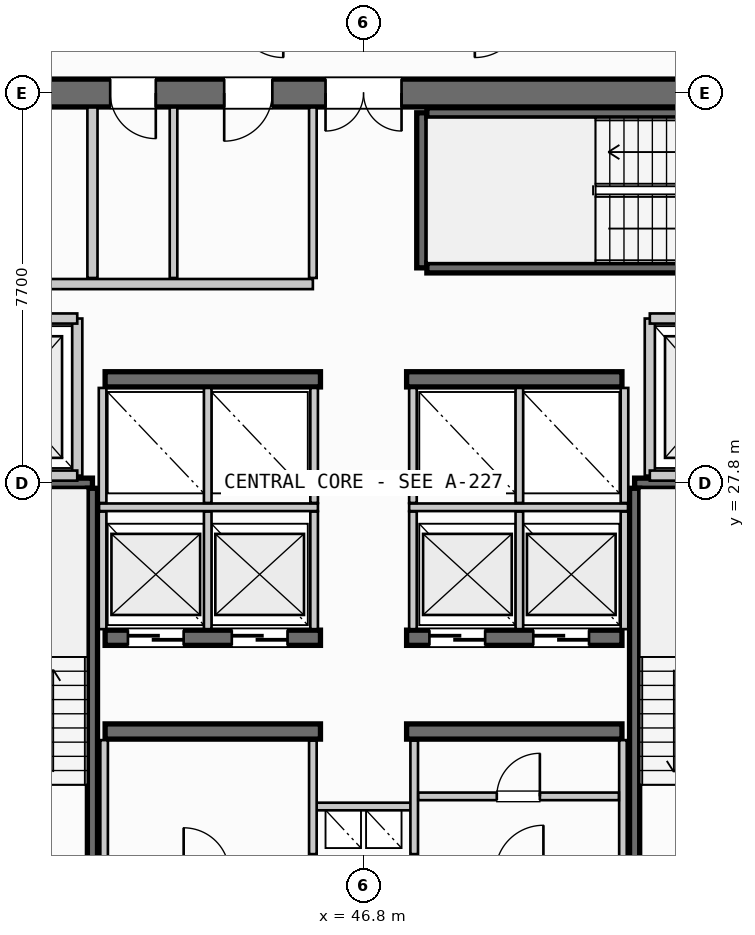
"""IFC4 building model, lengths in metres.
Left out: names, types, materials, properties, quantities, classifications, styles, units other than length and angle.
Written with IfcOpenShell. Run it as: python <this file> out.ifc"""

import sys

from ifc_helpers import new_model, si_unit, direction, frame, frame_2d, origin, place, context, subcontext, project, spatial, rectangle, extrude, source, transform, mapped, element, fill, save


model = new_model("IFC4")
c1 = context("Model", 3, precision=1e-05, world=origin(), true_north=direction((0.0, 1.0)))
c2 = subcontext(c1, "Body", "Model", "MODEL_VIEW")
j1 = project(units=[si_unit("LENGTHUNIT", "METRE"), si_unit("PLANEANGLEUNIT", "RADIAN")], contexts=[c1])
p1 = place(None, origin())
s1 = spatial("IfcSite", under=j1, at=p1, CompositionType="ELEMENT")
p2 = place(p1, origin())
s2 = spatial("IfcBuilding", under=s1, at=p2, CompositionType="ELEMENT")
p3 = place(p2, frame((0.0, 0.0, 197.4)))
s3 = spatial("IfcBuildingStorey", under=s2, at=p3, CompositionType="ELEMENT", Elevation=197.4)
p4 = place(p3, frame((55.6, 35.5, 0.0), z_axis=(0.0, 0.0, 1.0), x_axis=(-1.0, 0.0, 0.0)))
e1 = element("IfcWall", 1, at=p4, inside=s3, PredefinedType="SHEAR", context=c2, shape_type="SweptSolid", body=[
    extrude(rectangle(XDim=17.6, YDim=0.55, at=frame_2d((8.8, 0.0))), origin(), (0.0, 0.0, 1.0), 3.26),
])
p5 = place(p4, frame((8.05, 0.0, 0.0)))
e2 = element("IfcOpeningElement", 2, at=p5, cuts=e1, PredefinedType="OPENING", context=c2, shape_type="SweptSolid", body=[
    extrude(rectangle(XDim=1.5, YDim=2.2, at=frame_2d((0.75, 1.1))), frame((0.0, 0.285, 0.0), z_axis=(0.0, -1.0, 0.0), x_axis=(1.0, 0.0, 0.0)), (0.0, 0.0, 1.0), 0.57),
])
p6 = place(p4, frame((15.1, 0.0, 0.0)))
e3 = element("IfcOpeningElement", 3, at=p6, cuts=e1, PredefinedType="OPENING", context=c2, shape_type="SweptSolid", body=[
    extrude(rectangle(XDim=0.95, YDim=2.15, at=frame_2d((0.475, 1.075))), frame((0.0, 0.285, 0.0), z_axis=(0.0, -1.0, 0.0), x_axis=(1.0, 0.0, 0.0)), (0.0, 0.0, 1.0), 0.57),
])
p7 = place(p4, frame((12.9, 0.0, 0.0)))
e4 = element("IfcOpeningElement", 4, at=p7, cuts=e1, PredefinedType="OPENING", context=c2, shape_type="SweptSolid", body=[
    extrude(rectangle(XDim=0.9, YDim=2.15, at=frame_2d((0.45, 1.075))), frame((0.0, 0.285, 0.0), z_axis=(0.0, -1.0, 0.0), x_axis=(1.0, 0.0, 0.0)), (0.0, 0.0, 1.0), 0.57),
])
p8 = place(p4, frame((10.6, 0.0, 0.0)))
e5 = element("IfcOpeningElement", 5, at=p8, cuts=e1, PredefinedType="OPENING", context=c2, shape_type="SweptSolid", body=[
    extrude(rectangle(XDim=0.95, YDim=2.15, at=frame_2d((0.475, 1.075))), frame((0.0, 0.285, 0.0), z_axis=(0.0, -1.0, 0.0), x_axis=(1.0, 0.0, 0.0)), (0.0, 0.0, 1.0), 0.57),
])
for number, where, z_axis, x_axis in (
    (6, (41.7, 22.9, 0.0), (0.0, 0.0, 1.0), (1.0, 0.0, 0.0)),
    (7, (47.65, 22.9, 0.0), (0.0, 0.0, 1.0), (1.0, 0.0, 0.0)),
):
    element("IfcWall", number, at=place(p3, frame(where, z_axis=z_axis, x_axis=x_axis)), inside=s3, PredefinedType="SHEAR", context=c2, shape_type="SweptSolid", body=[
        extrude(rectangle(XDim=4.25, YDim=0.3, at=frame_2d((2.125, 0.0))), origin(), (0.0, 0.0, 1.0), 3.26),
    ])
p9 = place(p3, frame((41.7, 24.75, 0.0), z_axis=(0.0, 0.0, 1.0), x_axis=(1.0, 0.0, 0.0)))
e8 = element("IfcWall", 8, at=p9, inside=s3, PredefinedType="SHEAR", context=c2, shape_type="SweptSolid", body=[
    extrude(rectangle(XDim=4.25, YDim=0.3, at=frame_2d((2.125, 0.0))), origin(), (0.0, 0.0, 1.0), 3.26),
])
p10 = place(p9, frame((0.45, 0.0, 0.0)))
e9 = element("IfcOpeningElement", 9, at=p10, cuts=e8, PredefinedType="OPENING", context=c2, shape_type="SweptSolid", body=[
    extrude(rectangle(XDim=1.1, YDim=2.2, at=frame_2d((0.55, 1.1))), frame((0.0, 0.16, 0.0), z_axis=(0.0, -1.0, 0.0), x_axis=(1.0, 0.0, 0.0)), (0.0, 0.0, 1.0), 0.32),
])
p11 = place(p9, frame((2.5, 0.0, 0.0)))
e10 = element("IfcOpeningElement", 10, at=p11, cuts=e8, PredefinedType="OPENING", context=c2, shape_type="SweptSolid", body=[
    extrude(rectangle(XDim=1.1, YDim=2.2, at=frame_2d((0.55, 1.1))), frame((0.0, 0.16, 0.0), z_axis=(0.0, -1.0, 0.0), x_axis=(1.0, 0.0, 0.0)), (0.0, 0.0, 1.0), 0.32),
])
p12 = place(p3, frame((47.65, 24.75, 0.0), z_axis=(0.0, 0.0, 1.0), x_axis=(1.0, 0.0, 0.0)))
e11 = element("IfcWall", 11, at=p12, inside=s3, PredefinedType="SHEAR", context=c2, shape_type="SweptSolid", body=[
    extrude(rectangle(XDim=4.25, YDim=0.3, at=frame_2d((2.125, 0.0))), origin(), (0.0, 0.0, 1.0), 3.26),
])
p13 = place(p12, frame((0.45, 0.0, 0.0)))
e12 = element("IfcOpeningElement", 12, at=p13, cuts=e11, PredefinedType="OPENING", context=c2, shape_type="SweptSolid", body=[
    extrude(rectangle(XDim=1.1, YDim=2.2, at=frame_2d((0.55, 1.1))), frame((0.0, 0.16, 0.0), z_axis=(0.0, -1.0, 0.0), x_axis=(1.0, 0.0, 0.0)), (0.0, 0.0, 1.0), 0.32),
])
p14 = place(p12, frame((2.5, 0.0, 0.0)))
e13 = element("IfcOpeningElement", 13, at=p14, cuts=e11, PredefinedType="OPENING", context=c2, shape_type="SweptSolid", body=[
    extrude(rectangle(XDim=1.1, YDim=2.2, at=frame_2d((0.55, 1.1))), frame((0.0, 0.16, 0.0), z_axis=(0.0, -1.0, 0.0), x_axis=(1.0, 0.0, 0.0)), (0.0, 0.0, 1.0), 0.32),
])
for number, where, z_axis, x_axis in (
    (14, (41.7, 29.85, 0.0), (0.0, 0.0, 1.0), (1.0, 0.0, 0.0)),
    (15, (47.65, 29.85, 0.0), (0.0, 0.0, 1.0), (1.0, 0.0, 0.0)),
):
    element("IfcWall", number, at=place(p3, frame(where, z_axis=z_axis, x_axis=x_axis)), inside=s3, PredefinedType="SHEAR", context=c2, shape_type="SweptSolid", body=[
        extrude(rectangle(XDim=4.25, YDim=0.3, at=frame_2d((2.125, 0.0))), origin(), (0.0, 0.0, 1.0), 3.26),
    ])
p15 = place(p3, frame((38.39, 27.8, 0.0), z_axis=(0.0, 0.0, 1.0), x_axis=(1.0, 0.0, 0.0)))
e16 = element("IfcWall", 16, at=p15, inside=s3, PredefinedType="SHEAR", context=c2, shape_type="SweptSolid", body=[
    extrude(rectangle(XDim=3.06, YDim=0.2, at=frame_2d((1.53, 0.0))), origin(), (0.0, 0.0, 1.0), 3.26),
])
p16 = place(p3, frame((41.45, 27.7, 0.0), z_axis=(0.0, 0.0, 1.0), x_axis=(0.0, -1.0, 0.0)))
e17 = element("IfcWall", 17, at=p16, inside=s3, PredefinedType="SHEAR", context=c2, shape_type="SweptSolid", body=[
    extrude(rectangle(XDim=7.35, YDim=0.2, at=frame_2d((3.675, 0.0))), origin(), (0.0, 0.0, 1.0), 3.26),
])
p17 = place(p3, frame((52.15, 27.8, 0.0), z_axis=(0.0, 0.0, 1.0), x_axis=(1.0, 0.0, 0.0)))
e18 = element("IfcWall", 18, at=p17, inside=s3, PredefinedType="SHEAR", context=c2, shape_type="SweptSolid", body=[
    extrude(rectangle(XDim=3.06, YDim=0.2, at=frame_2d((1.53, 0.0))), origin(), (0.0, 0.0, 1.0), 3.26),
])
p18 = place(p3, frame((52.15, 20.35, 0.0), z_axis=(0.0, 0.0, 1.0), x_axis=(0.0, 1.0, 0.0)))
e19 = element("IfcWall", 19, at=p18, inside=s3, PredefinedType="SHEAR", context=c2, shape_type="SweptSolid", body=[
    extrude(rectangle(XDim=7.35, YDim=0.2, at=frame_2d((3.675, 0.0))), origin(), (0.0, 0.0, 1.0), 3.26),
])
p19 = place(p3, frame((47.95, 32.05, 0.0), z_axis=(0.0, 0.0, 1.0), x_axis=(0.0, 1.0, 0.0)))
e20 = element("IfcWall", 20, at=p19, inside=s3, PredefinedType="SHEAR", context=c2, shape_type="SweptSolid", body=[
    extrude(rectangle(XDim=3.06, YDim=0.2, at=frame_2d((1.53, 0.0))), origin(), (0.0, 0.0, 1.0), 3.26),
])
for number, where, z_axis, x_axis in (
    (21, (48.05, 35.11, 0.0), (0.0, 0.0, 1.0), (1.0, 0.0, 0.0)),
    (22, (55.4, 32.05, 0.0), (0.0, 0.0, 1.0), (-1.0, 0.0, 0.0)),
):
    element("IfcWall", number, at=place(p3, frame(where, z_axis=z_axis, x_axis=x_axis)), inside=s3, PredefinedType="SHEAR", context=c2, shape_type="SweptSolid", body=[
        extrude(rectangle(XDim=7.35, YDim=0.2, at=frame_2d((3.675, 0.0))), origin(), (0.0, 0.0, 1.0), 3.26),
    ])
p20 = place(p3, frame((45.8, 21.42, 0.0), z_axis=(0.0, 0.0, 1.0), x_axis=(1.0, 0.0, 0.0)))
e23 = element("IfcWall", 23, at=p20, inside=s3, PredefinedType="PARTITIONING", context=c2, shape_type="SweptSolid", body=[
    extrude(rectangle(XDim=2.0, YDim=0.15, at=frame_2d((1.0, 0.0))), origin(), (0.0, 0.0, 1.0), 2.595),
])
for number, where, z_axis, x_axis in (
    (24, (45.8, 20.48, 0.0), (0.0, 0.0, 1.0), (0.0, 1.0, 0.0)),
    (25, (47.8, 20.48, 0.0), (0.0, 0.0, 1.0), (0.0, 1.0, 0.0)),
):
    element("IfcWall", number, at=place(p3, frame(where, z_axis=z_axis, x_axis=x_axis)), inside=s3, PredefinedType="PARTITIONING", context=c2, shape_type="SweptSolid", body=[
        extrude(rectangle(XDim=2.24, YDim=0.15, at=frame_2d((1.12, 0.0))), origin(), (0.0, 0.0, 1.0), 2.595),
    ])
p21 = place(p3, frame((41.15, 27.95, 0.0), z_axis=(0.0, 0.0, 1.0), x_axis=(0.0, 1.0, 0.0)))
e26 = element("IfcWall", 26, at=p21, inside=s3, PredefinedType="PARTITIONING", context=c2, shape_type="SweptSolid", body=[
    extrude(rectangle(XDim=3.1, YDim=0.2, at=frame_2d((1.55, 0.0))), origin(), (0.0, 0.0, 1.0), 2.595),
])
for number, where, z_axis, x_axis in (
    (27, (38.285, 27.95, 0.0), (0.0, 0.0, 1.0), (1.0, 0.0, 0.0)),
    (28, (38.285, 31.05, 0.0), (0.0, 0.0, 1.0), (1.0, 0.0, 0.0)),
):
    element("IfcWall", number, at=place(p3, frame(where, z_axis=z_axis, x_axis=x_axis)), inside=s3, PredefinedType="PARTITIONING", context=c2, shape_type="SweptSolid", body=[
        extrude(rectangle(XDim=2.865, YDim=0.2, at=frame_2d((1.433, 0.0))), origin(), (0.0, 0.0, 1.0), 2.595),
    ])
p22 = place(p3, frame((52.45, 27.95, 0.0), z_axis=(0.0, 0.0, 1.0), x_axis=(0.0, 1.0, 0.0)))
e29 = element("IfcWall", 29, at=p22, inside=s3, PredefinedType="PARTITIONING", context=c2, shape_type="SweptSolid", body=[
    extrude(rectangle(XDim=3.1, YDim=0.2, at=frame_2d((1.55, 0.0))), origin(), (0.0, 0.0, 1.0), 2.595),
])
for number, where, z_axis, x_axis in (
    (30, (52.45, 27.95, 0.0), (0.0, 0.0, 1.0), (1.0, 0.0, 0.0)),
    (31, (52.45, 31.05, 0.0), (0.0, 0.0, 1.0), (1.0, 0.0, 0.0)),
):
    element("IfcWall", number, at=place(p3, frame(where, z_axis=z_axis, x_axis=x_axis)), inside=s3, PredefinedType="PARTITIONING", context=c2, shape_type="SweptSolid", body=[
        extrude(rectangle(XDim=2.865, YDim=0.2, at=frame_2d((1.433, 0.0))), origin(), (0.0, 0.0, 1.0), 2.595),
    ])
for number, where, z_axis, x_axis in (
    (32, (41.68, 20.385, 0.0), (0.0, 0.0, 1.0), (0.0, 1.0, 0.0)),
    (33, (51.92, 20.385, 0.0), (0.0, 0.0, 1.0), (0.0, 1.0, 0.0)),
):
    element("IfcWall", number, at=place(p3, frame(where, z_axis=z_axis, x_axis=x_axis)), inside=s3, PredefinedType="PARTITIONING", context=c2, shape_type="SweptSolid", body=[
        extrude(rectangle(XDim=2.345, YDim=0.15, at=frame_2d((1.172, 0.0))), origin(), (0.0, 0.0, 1.0), 2.595),
    ])
p23 = place(p3, frame((47.88, 21.62, 0.0), z_axis=(0.0, 0.0, 1.0), x_axis=(1.0, 0.0, 0.0)))
e34 = element("IfcWall", 34, at=p23, inside=s3, PredefinedType="PARTITIONING", context=c2, shape_type="SweptSolid", body=[
    extrude(rectangle(XDim=3.96, YDim=0.15, at=frame_2d((1.98, 0.0))), origin(), (0.0, 0.0, 1.0), 2.595),
])
p24 = place(p23, frame((1.55, 0.0, 0.0)))
e35 = element("IfcOpeningElement", 35, at=p24, cuts=e34, PredefinedType="OPENING", context=c2, shape_type="SweptSolid", body=[
    extrude(rectangle(XDim=0.85, YDim=2.15, at=frame_2d((0.425, 1.075))), frame((0.0, 0.085, 0.0), z_axis=(0.0, -1.0, 0.0), x_axis=(1.0, 0.0, 0.0)), (0.0, 0.0, 1.0), 0.17),
])
p25 = place(p3, frame((41.58, 27.325, 0.0), z_axis=(0.0, 0.0, 1.0), x_axis=(1.0, 0.0, 0.0)))
e36 = element("IfcWall", 36, at=p25, inside=s3, PredefinedType="PARTITIONING", context=c2, shape_type="SweptSolid", body=[
    extrude(rectangle(XDim=4.32, YDim=0.15, at=frame_2d((2.16, 0.0))), origin(), (0.0, 0.0, 1.0), 2.595),
])
p26 = place(p3, frame((47.7, 27.325, 0.0), z_axis=(0.0, 0.0, 1.0), x_axis=(1.0, 0.0, 0.0)))
e37 = element("IfcWall", 37, at=p26, inside=s3, PredefinedType="PARTITIONING", context=c2, shape_type="SweptSolid", body=[
    extrude(rectangle(XDim=4.32, YDim=0.15, at=frame_2d((2.16, 0.0))), origin(), (0.0, 0.0, 1.0), 2.595),
])
for number, where, z_axis, x_axis in (
    (38, (41.65, 24.92, 0.0), (0.0, 0.0, 1.0), (0.0, 1.0, 0.0)),
    (39, (43.725, 24.92, 0.0), (0.0, 0.0, 1.0), (0.0, 1.0, 0.0)),
    (40, (45.825, 24.92, 0.0), (0.0, 0.0, 1.0), (0.0, 1.0, 0.0)),
    (41, (47.775, 24.92, 0.0), (0.0, 0.0, 1.0), (0.0, 1.0, 0.0)),
    (42, (49.875, 24.92, 0.0), (0.0, 0.0, 1.0), (0.0, 1.0, 0.0)),
    (43, (51.95, 24.92, 0.0), (0.0, 0.0, 1.0), (0.0, 1.0, 0.0)),
):
    element("IfcWall", number, at=place(p3, frame(where, z_axis=z_axis, x_axis=x_axis)), inside=s3, PredefinedType="PARTITIONING", context=c2, shape_type="SweptSolid", body=[
        extrude(rectangle(XDim=2.32, YDim=0.15, at=frame_2d((1.16, 0.0))), origin(), (0.0, 0.0, 1.0), 2.595),
    ])
for number, where, z_axis, x_axis in (
    (44, (41.65, 27.41, 0.0), (0.0, 0.0, 1.0), (0.0, 1.0, 0.0)),
    (45, (43.725, 27.41, 0.0), (0.0, 0.0, 1.0), (0.0, 1.0, 0.0)),
    (46, (45.825, 27.41, 0.0), (0.0, 0.0, 1.0), (0.0, 1.0, 0.0)),
    (47, (47.775, 27.41, 0.0), (0.0, 0.0, 1.0), (0.0, 1.0, 0.0)),
    (48, (49.875, 27.41, 0.0), (0.0, 0.0, 1.0), (0.0, 1.0, 0.0)),
    (49, (51.95, 27.41, 0.0), (0.0, 0.0, 1.0), (0.0, 1.0, 0.0)),
):
    element("IfcWall", number, at=place(p3, frame(where, z_axis=z_axis, x_axis=x_axis)), inside=s3, PredefinedType="PARTITIONING", context=c2, shape_type="SweptSolid", body=[
        extrude(rectangle(XDim=2.27, YDim=0.15, at=frame_2d((1.135, 0.0))), origin(), (0.0, 0.0, 1.0), 2.595),
    ])
p27 = place(p3, frame((41.45, 31.85, 0.0), z_axis=(0.0, 0.0, 1.0), x_axis=(0.0, 1.0, 0.0)))
e50 = element("IfcWall", 50, at=p27, inside=s3, PredefinedType="PARTITIONING", context=c2, shape_type="SweptSolid", body=[
    extrude(rectangle(XDim=3.365, YDim=0.2, at=frame_2d((1.683, 0.0))), origin(), (0.0, 0.0, 1.0), 2.595),
])
p28 = place(p3, frame((38.285, 31.73, 0.0), z_axis=(0.0, 0.0, 1.0), x_axis=(1.0, 0.0, 0.0)))
e51 = element("IfcWall", 51, at=p28, inside=s3, PredefinedType="PARTITIONING", context=c2, shape_type="SweptSolid", body=[
    extrude(rectangle(XDim=7.515, YDim=0.2, at=frame_2d((3.758, 0.0))), origin(), (0.0, 0.0, 1.0), 2.595),
])
p29 = place(p3, frame((45.8, 31.85, 0.0), z_axis=(0.0, 0.0, 1.0), x_axis=(0.0, 1.0, 0.0)))
e52 = element("IfcWall", 52, at=p29, inside=s3, PredefinedType="PARTITIONING", context=c2, shape_type="SweptSolid", body=[
    extrude(rectangle(XDim=3.365, YDim=0.15, at=frame_2d((1.683, 0.0))), origin(), (0.0, 0.0, 1.0), 2.595),
])
p30 = place(p3, frame((43.05, 31.85, 0.0), z_axis=(0.0, 0.0, 1.0), x_axis=(0.0, 1.0, 0.0)))
e53 = element("IfcWall", 53, at=p30, inside=s3, PredefinedType="PLUMBINGWALL", context=c2, shape_type="SweptSolid", body=[
    extrude(rectangle(XDim=3.365, YDim=0.15, at=frame_2d((1.683, 0.0))), origin(), (0.0, 0.0, 1.0), 2.595),
])
m1 = source(origin(), c2, "Body", "SweptSolid", [
    extrude(rectangle(XDim=1.5, YDim=2.2, at=frame_2d((0.75, 1.1))), frame((0.0, 0.025, 0.0), z_axis=(0.0, -1.0, 0.0), x_axis=(1.0, 0.0, 0.0)), (0.0, 0.0, 1.0), 0.05),
])
p31 = place(p5, origin())
e54 = element("IfcDoor", 54, at=p31, inside=s3, OperationType="DOUBLE_DOOR_SINGLE_SWING", PredefinedType="DOOR", context=c2, shape_type="MappedRepresentation", body=[
    mapped(m1, transform((0.0, 0.0, 0.0), scale=1.0)),
])
fill(e2, e54)
m2 = source(origin(), c2, "Body", "SweptSolid", [
    extrude(rectangle(XDim=1.1, YDim=2.2, at=frame_2d((0.55, 1.1))), frame((0.0, 0.025, 0.0), z_axis=(0.0, -1.0, 0.0), x_axis=(1.0, 0.0, 0.0)), (0.0, 0.0, 1.0), 0.05),
])
p32 = place(p10, origin())
e55 = element("IfcDoor", 55, at=p32, inside=s3, OperationType="SLIDING_TO_RIGHT", PredefinedType="DOOR", context=c2, shape_type="MappedRepresentation", body=[
    mapped(m2, transform((0.0, 0.0, 0.0), scale=1.0)),
])
fill(e9, e55)
p33 = place(p11, origin())
e56 = element("IfcDoor", 56, at=p33, inside=s3, OperationType="SLIDING_TO_RIGHT", PredefinedType="DOOR", context=c2, shape_type="MappedRepresentation", body=[
    mapped(m2, transform((0.0, 0.0, 0.0), scale=1.0)),
])
fill(e10, e56)
p34 = place(p13, origin())
e57 = element("IfcDoor", 57, at=p34, inside=s3, OperationType="SLIDING_TO_RIGHT", PredefinedType="DOOR", context=c2, shape_type="MappedRepresentation", body=[
    mapped(m2, transform((0.0, 0.0, 0.0), scale=1.0)),
])
fill(e12, e57)
p35 = place(p14, origin())
e58 = element("IfcDoor", 58, at=p35, inside=s3, OperationType="SLIDING_TO_RIGHT", PredefinedType="DOOR", context=c2, shape_type="MappedRepresentation", body=[
    mapped(m2, transform((0.0, 0.0, 0.0), scale=1.0)),
])
fill(e13, e58)
m3 = source(origin(), c2, "Body", "SweptSolid", [
    extrude(rectangle(XDim=0.9, YDim=2.15, at=frame_2d((0.45, 1.075))), frame((0.0, 0.025, 0.0), z_axis=(0.0, -1.0, 0.0), x_axis=(1.0, 0.0, 0.0)), (0.0, 0.0, 1.0), 0.05),
])
p36 = place(p7, origin())
e59 = element("IfcDoor", 59, at=p36, inside=s3, OperationType="SINGLE_SWING_LEFT", PredefinedType="DOOR", context=c2, shape_type="MappedRepresentation", body=[
    mapped(m3, transform((0.0, 0.0, 0.0), scale=1.0)),
])
fill(e4, e59)
m4 = source(origin(), c2, "Body", "SweptSolid", [
    extrude(rectangle(XDim=0.95, YDim=2.15, at=frame_2d((0.475, 1.075))), frame((0.0, 0.025, 0.0), z_axis=(0.0, -1.0, 0.0), x_axis=(1.0, 0.0, 0.0)), (0.0, 0.0, 1.0), 0.05),
])
p37 = place(p8, origin())
e60 = element("IfcDoor", 60, at=p37, inside=s3, OperationType="SINGLE_SWING_RIGHT", PredefinedType="DOOR", context=c2, shape_type="MappedRepresentation", body=[
    mapped(m4, transform((0.0, 0.0, 0.0), scale=1.0)),
])
fill(e5, e60)
m5 = source(origin(), c2, "Body", "SweptSolid", [
    extrude(rectangle(XDim=0.85, YDim=2.15, at=frame_2d((0.425, 1.075))), frame((0.0, 0.025, 0.0), z_axis=(0.0, -1.0, 0.0), x_axis=(1.0, 0.0, 0.0)), (0.0, 0.0, 1.0), 0.05),
])
p38 = place(p24, origin())
e61 = element("IfcDoor", 61, at=p38, inside=s3, OperationType="SINGLE_SWING_RIGHT", PredefinedType="DOOR", context=c2, shape_type="MappedRepresentation", body=[
    mapped(m5, transform((0.0, 0.0, 0.0), scale=1.0)),
])
fill(e35, e61)
save(model, sys.argv[1])
